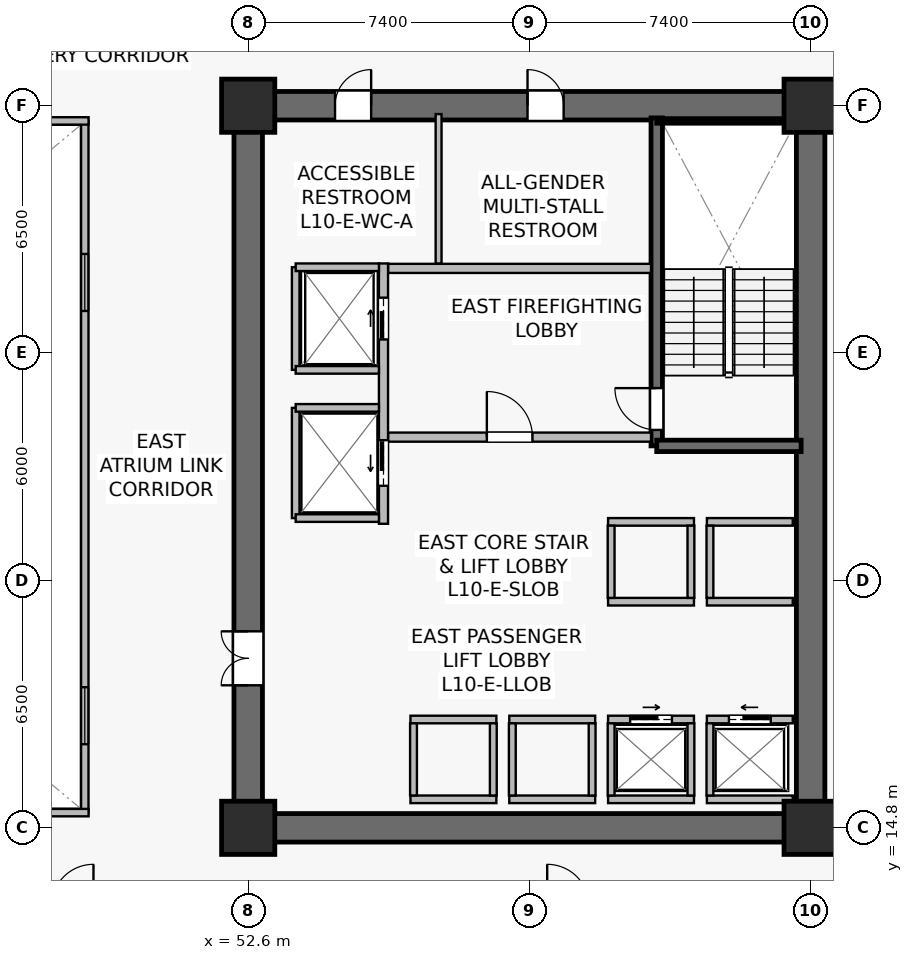
"""IFC4 building model, lengths in metres.
Left out: names, types, materials, properties, quantities, classifications, styles, units other than length and angle.
Written with IfcOpenShell. Run it as: python <this file> out.ifc"""

import sys

from ifc_helpers import new_model, si_unit, direction, frame, frame_2d, origin, origin_2d, place, context, subcontext, project, spatial, rectangle, extrude, source, transform, mapped, element, fill, save


model = new_model("IFC4")
c1 = context("Model", 3, precision=1e-05, world=origin(), true_north=direction((0.0, 1.0)))
c2 = subcontext(c1, "Body", "Model", "MODEL_VIEW")
j1 = project(units=[si_unit("LENGTHUNIT", "METRE"), si_unit("PLANEANGLEUNIT", "RADIAN")], contexts=[c1])
p1 = place(None, origin())
s1 = spatial("IfcSite", under=j1, at=p1, CompositionType="ELEMENT")
p2 = place(p1, origin())
s2 = spatial("IfcBuilding", under=s1, at=p2, CompositionType="ELEMENT")
p3 = place(p2, frame((0.0, 0.0, 41.6)))
s3 = spatial("IfcBuildingStorey", under=s2, at=p3, CompositionType="ELEMENT", Elevation=41.6)
p4 = place(p3, frame((52.225, 14.8, 0.0), z_axis=(0.0, 0.0, 1.0), x_axis=(1.0, 0.0, 0.0)))
e1 = element("IfcWall", 1, at=p4, inside=s3, PredefinedType="SHEAR", context=c2, shape_type="SweptSolid", body=[
    extrude(rectangle(XDim=15.55, YDim=0.75, at=frame_2d((7.775, 0.0))), origin(), (0.0, 0.0, 1.0), 3.78),
])
p5 = place(p3, frame((52.225, 33.8, 0.0), z_axis=(0.0, 0.0, 1.0), x_axis=(1.0, 0.0, 0.0)))
e2 = element("IfcWall", 2, at=p5, inside=s3, PredefinedType="SHEAR", context=c2, shape_type="SweptSolid", body=[
    extrude(rectangle(XDim=15.55, YDim=0.75, at=frame_2d((7.775, 0.0))), origin(), (0.0, 0.0, 1.0), 3.78),
])
p6 = place(p5, frame((7.725, 0.0, 0.0)))
e3 = element("IfcOpeningElement", 3, at=p6, cuts=e2, PredefinedType="OPENING", context=c2, shape_type="SweptSolid", body=[
    extrude(rectangle(XDim=0.95, YDim=2.15, at=frame_2d((0.475, 1.075))), frame((0.0, 0.385, 0.0), z_axis=(0.0, -1.0, 0.0), x_axis=(1.0, 0.0, 0.0)), (0.0, 0.0, 1.0), 0.77),
])
p7 = place(p5, frame((2.66, 0.0, 0.0)))
e4 = element("IfcOpeningElement", 4, at=p7, cuts=e2, PredefinedType="OPENING", context=c2, shape_type="SweptSolid", body=[
    extrude(rectangle(XDim=0.95, YDim=2.15, at=frame_2d((0.475, 1.075))), frame((0.0, 0.385, 0.0), z_axis=(0.0, -1.0, 0.0), x_axis=(1.0, 0.0, 0.0)), (0.0, 0.0, 1.0), 0.77),
])
p8 = place(p3, frame((52.6, 15.175, 0.0), z_axis=(0.0, 0.0, 1.0), x_axis=(0.0, 1.0, 0.0)))
e5 = element("IfcWall", 5, at=p8, inside=s3, PredefinedType="SHEAR", context=c2, shape_type="SweptSolid", body=[
    extrude(rectangle(XDim=18.25, YDim=0.75, at=frame_2d((9.125, 0.0))), origin(), (0.0, 0.0, 1.0), 3.78),
])
p9 = place(p8, frame((3.375, 0.0, 0.0)))
e6 = element("IfcOpeningElement", 6, at=p9, cuts=e5, PredefinedType="OPENING", context=c2, shape_type="SweptSolid", body=[
    extrude(rectangle(XDim=1.42, YDim=2.2, at=frame_2d((0.71, 1.1))), frame((0.0, 0.385, 0.0), z_axis=(0.0, -1.0, 0.0), x_axis=(1.0, 0.0, 0.0)), (0.0, 0.0, 1.0), 0.77),
])
p10 = place(p3, frame((67.4, 15.175, 0.0), z_axis=(0.0, 0.0, 1.0), x_axis=(0.0, 1.0, 0.0)))
e7 = element("IfcWall", 7, at=p10, inside=s3, PredefinedType="SHEAR", context=c2, shape_type="SweptSolid", body=[
    extrude(rectangle(XDim=18.25, YDim=0.75, at=frame_2d((9.125, 0.0))), origin(), (0.0, 0.0, 1.0), 3.78),
])
p11 = place(p3, frame((63.35, 24.85, 0.0), z_axis=(0.0, 0.0, 1.0), x_axis=(0.0, 1.0, 0.0)))
e8 = element("IfcWall", 8, at=p11, inside=s3, PredefinedType="SHEAR", context=c2, shape_type="SweptSolid", body=[
    extrude(rectangle(XDim=8.63, YDim=0.3, at=frame_2d((4.315, 0.0))), origin(), (0.0, 0.0, 1.0), 3.78),
])
p12 = place(p11, frame((0.42, 0.0, 0.0)))
e9 = element("IfcOpeningElement", 9, at=p12, cuts=e8, PredefinedType="OPENING", context=c2, shape_type="SweptSolid", body=[
    extrude(rectangle(XDim=1.1, YDim=2.15, at=frame_2d((0.55, 1.075))), frame((0.0, 0.16, 0.0), z_axis=(0.0, -1.0, 0.0), x_axis=(1.0, 0.0, 0.0)), (0.0, 0.0, 1.0), 0.32),
])
p13 = place(p3, frame((63.35, 24.85, 0.0), z_axis=(0.0, 0.0, 1.0), x_axis=(1.0, 0.0, 0.0)))
e10 = element("IfcWall", 10, at=p13, inside=s3, PredefinedType="SHEAR", context=c2, shape_type="SweptSolid", body=[
    extrude(rectangle(XDim=3.8, YDim=0.3, at=frame_2d((1.9, 0.0))), origin(), (0.0, 0.0, 1.0), 3.78),
])
p14 = place(p3, frame((63.35, 33.4, 0.0), z_axis=(0.0, 0.0, 1.0), x_axis=(1.0, 0.0, 0.0)))
e11 = element("IfcWall", 11, at=p14, inside=s3, PredefinedType="SOLIDWALL", context=c2, shape_type="SweptSolid", body=[
    extrude(rectangle(XDim=3.72, YDim=0.12, at=frame_2d((1.86, 0.0))), origin(), (0.0, 0.0, 1.0), 3.78),
])
m1 = source(origin(), c2, "Body", "SweptSolid", [
    extrude(rectangle(XDim=1.4, YDim=1.4, at=origin_2d()), origin(), (0.0, 0.0, 1.0), 4.1),
])
for number, where, z_axis, x_axis in (
    (12, (52.6, 14.8, 0.0), (0.0, 0.0, 1.0), (1.0, 0.0, 0.0)),
    (13, (67.4, 14.8, 0.0), (0.0, 0.0, 1.0), (1.0, 0.0, 0.0)),
    (14, (52.6, 33.8, 0.0), (0.0, 0.0, 1.0), (1.0, 0.0, 0.0)),
    (15, (67.4, 33.8, 0.0), (0.0, 0.0, 1.0), (1.0, 0.0, 0.0)),
):
    element("IfcColumn", number, at=place(p3, frame(where, z_axis=z_axis, x_axis=x_axis)), inside=s3, PredefinedType="COLUMN", context=c2, shape_type="MappedRepresentation", body=[
        mapped(m1, transform((0.0, 0.0, 0.0), scale=1.0)),
    ])
p15 = place(p3, frame((56.28, 25.08, 0.0), z_axis=(0.0, 0.0, 1.0), x_axis=(1.0, 0.0, 0.0)))
e16 = element("IfcWall", 16, at=p15, inside=s3, PredefinedType="SOLIDWALL", context=c2, shape_type="SweptSolid", body=[
    extrude(rectangle(XDim=6.92, YDim=0.24, at=frame_2d((3.46, 0.0))), origin(), (0.0, 0.0, 1.0), 3.065),
])
p16 = place(p15, frame((2.6, 0.0, 0.0)))
e17 = element("IfcOpeningElement", 17, at=p16, cuts=e16, PredefinedType="OPENING", context=c2, shape_type="SweptSolid", body=[
    extrude(rectangle(XDim=1.2, YDim=2.16, at=frame_2d((0.6, 1.08))), frame((0.0, 0.13, 0.0), z_axis=(0.0, -1.0, 0.0), x_axis=(1.0, 0.0, 0.0)), (0.0, 0.0, 1.0), 0.26),
])
p17 = place(p3, frame((56.28, 29.52, 0.0), z_axis=(0.0, 0.0, 1.0), x_axis=(1.0, 0.0, 0.0)))
e18 = element("IfcWall", 18, at=p17, inside=s3, PredefinedType="SOLIDWALL", context=c2, shape_type="SweptSolid", body=[
    extrude(rectangle(XDim=6.92, YDim=0.24, at=frame_2d((3.46, 0.0))), origin(), (0.0, 0.0, 1.0), 3.065),
])
p18 = place(p3, frame((56.16, 22.8, 0.0), z_axis=(0.0, 0.0, 1.0), x_axis=(0.0, 1.0, 0.0)))
e19 = element("IfcWall", 19, at=p18, inside=s3, PredefinedType="SOLIDWALL", context=c2, shape_type="SweptSolid", body=[
    extrude(rectangle(XDim=6.85, YDim=0.24, at=frame_2d((3.425, 0.0))), origin(), (0.0, 0.0, 1.0), 2.865),
])
p19 = place(p18, frame((4.85, 0.0, 0.0)))
e20 = element("IfcOpeningElement", 20, at=p19, cuts=e19, PredefinedType="OPENING", context=c2, shape_type="SweptSolid", body=[
    extrude(rectangle(XDim=1.1, YDim=2.22, at=frame_2d((0.55, 1.11))), frame((0.0, 0.13, 0.0), z_axis=(0.0, -1.0, 0.0), x_axis=(1.0, 0.0, 0.0)), (0.0, 0.0, 1.0), 0.26),
])
p20 = place(p18, frame((1.0, 0.0, 0.0)))
e21 = element("IfcOpeningElement", 21, at=p20, cuts=e19, PredefinedType="OPENING", context=c2, shape_type="SweptSolid", body=[
    extrude(rectangle(XDim=1.2, YDim=2.22, at=frame_2d((0.6, 1.11))), frame((0.0, 0.13, 0.0), z_axis=(0.0, -1.0, 0.0), x_axis=(1.0, 0.0, 0.0)), (0.0, 0.0, 1.0), 0.26),
])
p21 = place(p3, frame((64.67, 17.65, 0.0), z_axis=(0.0, 0.0, 1.0), x_axis=(1.0, 0.0, 0.0)))
e22 = element("IfcWall", 22, at=p21, inside=s3, PredefinedType="SOLIDWALL", context=c2, shape_type="SweptSolid", body=[
    extrude(rectangle(XDim=2.26, YDim=0.2, at=frame_2d((1.13, 0.0))), origin(), (0.0, 0.0, 1.0), 3.78),
])
p22 = place(p21, frame((0.58, 0.0, 0.0)))
e23 = element("IfcOpeningElement", 23, at=p22, cuts=e22, PredefinedType="OPENING", context=c2, shape_type="SweptSolid", body=[
    extrude(rectangle(XDim=1.1, YDim=2.22, at=frame_2d((0.55, 1.11))), frame((0.0, 0.11, 0.0), z_axis=(0.0, -1.0, 0.0), x_axis=(1.0, 0.0, 0.0)), (0.0, 0.0, 1.0), 0.22),
])
p23 = place(p3, frame((64.67, 15.55, 0.0), z_axis=(0.0, 0.0, 1.0), x_axis=(1.0, 0.0, 0.0)))
e24 = element("IfcWall", 24, at=p23, inside=s3, PredefinedType="SOLIDWALL", context=c2, shape_type="SweptSolid", body=[
    extrude(rectangle(XDim=2.26, YDim=0.2, at=frame_2d((1.13, 0.0))), origin(), (0.0, 0.0, 1.0), 3.78),
])
p24 = place(p3, frame((64.75, 15.65, 0.0), z_axis=(0.0, 0.0, 1.0), x_axis=(0.0, 1.0, 0.0)))
e25 = element("IfcWall", 25, at=p24, inside=s3, PredefinedType="SOLIDWALL", context=c2, shape_type="SweptSolid", body=[
    extrude(rectangle(XDim=1.9, YDim=0.18, at=frame_2d((0.95, 0.0))), origin(), (0.0, 0.0, 1.0), 3.78),
])
p25 = place(p3, frame((62.07, 17.65, 0.0), z_axis=(0.0, 0.0, 1.0), x_axis=(1.0, 0.0, 0.0)))
e26 = element("IfcWall", 26, at=p25, inside=s3, PredefinedType="SOLIDWALL", context=c2, shape_type="SweptSolid", body=[
    extrude(rectangle(XDim=2.26, YDim=0.2, at=frame_2d((1.13, 0.0))), origin(), (0.0, 0.0, 1.0), 3.78),
])
p26 = place(p25, frame((0.58, 0.0, 0.0)))
e27 = element("IfcOpeningElement", 27, at=p26, cuts=e26, PredefinedType="OPENING", context=c2, shape_type="SweptSolid", body=[
    extrude(rectangle(XDim=1.1, YDim=2.22, at=frame_2d((0.55, 1.11))), frame((0.0, 0.11, 0.0), z_axis=(0.0, -1.0, 0.0), x_axis=(1.0, 0.0, 0.0)), (0.0, 0.0, 1.0), 0.22),
])
p27 = place(p3, frame((62.07, 15.55, 0.0), z_axis=(0.0, 0.0, 1.0), x_axis=(1.0, 0.0, 0.0)))
e28 = element("IfcWall", 28, at=p27, inside=s3, PredefinedType="SOLIDWALL", context=c2, shape_type="SweptSolid", body=[
    extrude(rectangle(XDim=2.26, YDim=0.2, at=frame_2d((1.13, 0.0))), origin(), (0.0, 0.0, 1.0), 3.78),
])
for number, where, z_axis, x_axis in (
    (29, (62.15, 15.65, 0.0), (0.0, 0.0, 1.0), (0.0, 1.0, 0.0)),
    (30, (64.25, 15.65, 0.0), (0.0, 0.0, 1.0), (0.0, 1.0, 0.0)),
):
    element("IfcWall", number, at=place(p3, frame(where, z_axis=z_axis, x_axis=x_axis)), inside=s3, PredefinedType="SOLIDWALL", context=c2, shape_type="SweptSolid", body=[
        extrude(rectangle(XDim=1.9, YDim=0.18, at=frame_2d((0.95, 0.0))), origin(), (0.0, 0.0, 1.0), 3.78),
    ])
for number, where, z_axis, x_axis in (
    (31, (59.47, 17.65, 0.0), (0.0, 0.0, 1.0), (1.0, 0.0, 0.0)),
    (32, (59.47, 15.55, 0.0), (0.0, 0.0, 1.0), (1.0, 0.0, 0.0)),
):
    element("IfcWall", number, at=place(p3, frame(where, z_axis=z_axis, x_axis=x_axis)), inside=s3, PredefinedType="SOLIDWALL", context=c2, shape_type="SweptSolid", body=[
        extrude(rectangle(XDim=2.26, YDim=0.2, at=frame_2d((1.13, 0.0))), origin(), (0.0, 0.0, 1.0), 3.065),
    ])
for number, where, z_axis, x_axis in (
    (33, (59.55, 15.65, 0.0), (0.0, 0.0, 1.0), (0.0, 1.0, 0.0)),
    (34, (61.65, 15.65, 0.0), (0.0, 0.0, 1.0), (0.0, 1.0, 0.0)),
):
    element("IfcWall", number, at=place(p3, frame(where, z_axis=z_axis, x_axis=x_axis)), inside=s3, PredefinedType="SOLIDWALL", context=c2, shape_type="SweptSolid", body=[
        extrude(rectangle(XDim=1.9, YDim=0.18, at=frame_2d((0.95, 0.0))), origin(), (0.0, 0.0, 1.0), 3.78),
    ])
for number, where, z_axis, x_axis in (
    (35, (56.87, 17.65, 0.0), (0.0, 0.0, 1.0), (1.0, 0.0, 0.0)),
    (36, (56.87, 15.55, 0.0), (0.0, 0.0, 1.0), (1.0, 0.0, 0.0)),
):
    element("IfcWall", number, at=place(p3, frame(where, z_axis=z_axis, x_axis=x_axis)), inside=s3, PredefinedType="SOLIDWALL", context=c2, shape_type="SweptSolid", body=[
        extrude(rectangle(XDim=2.26, YDim=0.2, at=frame_2d((1.13, 0.0))), origin(), (0.0, 0.0, 1.0), 3.78),
    ])
for number, where, z_axis, x_axis in (
    (37, (56.95, 15.65, 0.0), (0.0, 0.0, 1.0), (0.0, 1.0, 0.0)),
    (38, (59.05, 15.65, 0.0), (0.0, 0.0, 1.0), (0.0, 1.0, 0.0)),
):
    element("IfcWall", number, at=place(p3, frame(where, z_axis=z_axis, x_axis=x_axis)), inside=s3, PredefinedType="SOLIDWALL", context=c2, shape_type="SweptSolid", body=[
        extrude(rectangle(XDim=1.9, YDim=0.18, at=frame_2d((0.95, 0.0))), origin(), (0.0, 0.0, 1.0), 3.78),
    ])
for number, where, z_axis, x_axis in (
    (39, (64.67, 20.75, 0.0), (0.0, 0.0, 1.0), (1.0, 0.0, 0.0)),
    (40, (64.67, 22.85, 0.0), (0.0, 0.0, 1.0), (1.0, 0.0, 0.0)),
):
    element("IfcWall", number, at=place(p3, frame(where, z_axis=z_axis, x_axis=x_axis)), inside=s3, PredefinedType="SOLIDWALL", context=c2, shape_type="SweptSolid", body=[
        extrude(rectangle(XDim=2.26, YDim=0.2, at=frame_2d((1.13, 0.0))), origin(), (0.0, 0.0, 1.0), 3.78),
    ])
p28 = place(p3, frame((64.75, 20.85, 0.0), z_axis=(0.0, 0.0, 1.0), x_axis=(0.0, 1.0, 0.0)))
e41 = element("IfcWall", 41, at=p28, inside=s3, PredefinedType="SOLIDWALL", context=c2, shape_type="SweptSolid", body=[
    extrude(rectangle(XDim=1.9, YDim=0.18, at=frame_2d((0.95, 0.0))), origin(), (0.0, 0.0, 1.0), 3.78),
])
for number, where, z_axis, x_axis in (
    (42, (62.07, 20.75, 0.0), (0.0, 0.0, 1.0), (1.0, 0.0, 0.0)),
    (43, (62.07, 22.85, 0.0), (0.0, 0.0, 1.0), (1.0, 0.0, 0.0)),
):
    element("IfcWall", number, at=place(p3, frame(where, z_axis=z_axis, x_axis=x_axis)), inside=s3, PredefinedType="SOLIDWALL", context=c2, shape_type="SweptSolid", body=[
        extrude(rectangle(XDim=2.26, YDim=0.2, at=frame_2d((1.13, 0.0))), origin(), (0.0, 0.0, 1.0), 3.78),
    ])
for number, where, z_axis, x_axis in (
    (44, (62.15, 20.85, 0.0), (0.0, 0.0, 1.0), (0.0, 1.0, 0.0)),
    (45, (64.25, 20.85, 0.0), (0.0, 0.0, 1.0), (0.0, 1.0, 0.0)),
):
    element("IfcWall", number, at=place(p3, frame(where, z_axis=z_axis, x_axis=x_axis)), inside=s3, PredefinedType="SOLIDWALL", context=c2, shape_type="SweptSolid", body=[
        extrude(rectangle(XDim=1.9, YDim=0.18, at=frame_2d((0.95, 0.0))), origin(), (0.0, 0.0, 1.0), 3.78),
    ])
p29 = place(p3, frame((53.85, 26.85, 0.0), z_axis=(0.0, 0.0, 1.0), x_axis=(0.0, 1.0, 0.0)))
e46 = element("IfcWall", 46, at=p29, inside=s3, PredefinedType="SOLIDWALL", context=c2, shape_type="SweptSolid", body=[
    extrude(rectangle(XDim=2.7, YDim=0.2, at=frame_2d((1.35, 0.0))), origin(), (0.0, 0.0, 1.0), 3.78),
])
p30 = place(p3, frame((53.85, 29.55, 0.0), z_axis=(0.0, 0.0, 1.0), x_axis=(1.0, 0.0, 0.0)))
e47 = element("IfcWall", 47, at=p30, inside=s3, PredefinedType="SOLIDWALL", context=c2, shape_type="SweptSolid", body=[
    extrude(rectangle(XDim=2.19, YDim=0.2, at=frame_2d((1.095, 0.0))), origin(), (0.0, 0.0, 1.0), 3.78),
])
p31 = place(p3, frame((53.85, 26.85, 0.0), z_axis=(0.0, 0.0, 1.0), x_axis=(1.0, 0.0, 0.0)))
e48 = element("IfcWall", 48, at=p31, inside=s3, PredefinedType="SOLIDWALL", context=c2, shape_type="SweptSolid", body=[
    extrude(rectangle(XDim=2.19, YDim=0.2, at=frame_2d((1.095, 0.0))), origin(), (0.0, 0.0, 1.0), 3.177),
])
p32 = place(p3, frame((53.85, 22.95, 0.0), z_axis=(0.0, 0.0, 1.0), x_axis=(0.0, 1.0, 0.0)))
e49 = element("IfcWall", 49, at=p32, inside=s3, PredefinedType="SOLIDWALL", context=c2, shape_type="SweptSolid", body=[
    extrude(rectangle(XDim=2.9, YDim=0.2, at=frame_2d((1.45, 0.0))), origin(), (0.0, 0.0, 1.0), 2.865),
])
for number, where, z_axis, x_axis in (
    (50, (53.85, 25.85, 0.0), (0.0, 0.0, 1.0), (1.0, 0.0, 0.0)),
    (51, (53.85, 22.95, 0.0), (0.0, 0.0, 1.0), (1.0, 0.0, 0.0)),
):
    element("IfcWall", number, at=place(p3, frame(where, z_axis=z_axis, x_axis=x_axis)), inside=s3, PredefinedType="SOLIDWALL", context=c2, shape_type="SweptSolid", body=[
        extrude(rectangle(XDim=2.19, YDim=0.2, at=frame_2d((1.095, 0.0))), origin(), (0.0, 0.0, 1.0), 3.78),
    ])
p33 = place(p3, frame((57.61, 29.65, 0.0), z_axis=(0.0, 0.0, 1.0), x_axis=(0.0, 1.0, 0.0)))
e52 = element("IfcWall", 52, at=p33, inside=s3, PredefinedType="PLUMBINGWALL", context=c2, shape_type="SweptSolid", body=[
    extrude(rectangle(XDim=3.93, YDim=0.155, at=frame_2d((1.965, 0.0))), origin(), (0.0, 0.0, 1.0), 3.78),
])
p34 = place(p3, frame((48.3, 15.2, 0.0), z_axis=(0.0, 0.0, 1.0), x_axis=(0.0, 1.0, 0.0)))
e53 = element("IfcWall", 53, at=p34, inside=s3, PredefinedType="SOLIDWALL", context=c2, shape_type="SweptSolid", body=[
    extrude(rectangle(XDim=18.2, YDim=0.195, at=frame_2d((9.1, 0.0))), origin(), (0.0, 0.0, 1.0), 3.78),
])
p35 = place(p34, frame((1.8, 0.0, 0.9)))
e54 = element("IfcOpeningElement", 54, at=p35, cuts=e53, PredefinedType="OPENING", context=c2, shape_type="SweptSolid", body=[
    extrude(rectangle(XDim=1.5, YDim=1.4, at=frame_2d((0.75, 0.7))), frame((0.0, 0.107, 0.0), z_axis=(0.0, -1.0, 0.0), x_axis=(1.0, 0.0, 0.0)), (0.0, 0.0, 1.0), 0.215),
])
p36 = place(p34, frame((13.2, 0.0, 0.9)))
e55 = element("IfcOpeningElement", 55, at=p36, cuts=e53, PredefinedType="OPENING", context=c2, shape_type="SweptSolid", body=[
    extrude(rectangle(XDim=1.5, YDim=1.4, at=frame_2d((0.75, 0.7))), frame((0.0, 0.107, 0.0), z_axis=(0.0, -1.0, 0.0), x_axis=(1.0, 0.0, 0.0)), (0.0, 0.0, 1.0), 0.215),
])
for number, where, z_axis, x_axis in (
    (56, (26.4, 15.2, 0.0), (0.0, 0.0, 1.0), (1.0, 0.0, 0.0)),
    (57, (26.4, 33.4, 0.0), (0.0, 0.0, 1.0), (1.0, 0.0, 0.0)),
):
    element("IfcWall", number, at=place(p3, frame(where, z_axis=z_axis, x_axis=x_axis)), inside=s3, PredefinedType="SOLIDWALL", context=c2, shape_type="SweptSolid", body=[
        extrude(rectangle(XDim=22.0, YDim=0.195, at=frame_2d((11.0, 0.0))), origin(), (0.0, 0.0, 1.0), 3.78),
    ])
m2 = source(origin(), c2, "Body", "SweptSolid", [
    extrude(rectangle(XDim=1.5, YDim=1.4, at=frame_2d((0.75, 0.7))), frame((0.0, 0.03, 0.0), z_axis=(0.0, -1.0, 0.0), x_axis=(1.0, 0.0, 0.0)), (0.0, 0.0, 1.0), 0.06),
])
p37 = place(p35, origin())
e58 = element("IfcWindow", 58, at=p37, inside=s3, PartitioningType="SINGLE_PANEL", PredefinedType="WINDOW", context=c2, shape_type="MappedRepresentation", body=[
    mapped(m2, transform((0.0, 0.0, 0.0), scale=1.0)),
])
fill(e54, e58)
p38 = place(p36, origin())
e59 = element("IfcWindow", 59, at=p38, inside=s3, PartitioningType="SINGLE_PANEL", PredefinedType="WINDOW", context=c2, shape_type="MappedRepresentation", body=[
    mapped(m2, transform((0.0, 0.0, 0.0), scale=1.0)),
])
fill(e55, e59)
m3 = source(origin(), c2, "Body", "SweptSolid", [
    extrude(rectangle(XDim=1.1, YDim=2.15, at=frame_2d((0.55, 1.075))), frame((0.0, 0.025, 0.0), z_axis=(0.0, -1.0, 0.0), x_axis=(1.0, 0.0, 0.0)), (0.0, 0.0, 1.0), 0.05),
])
p39 = place(p12, origin())
e60 = element("IfcDoor", 60, at=p39, inside=s3, OperationType="SINGLE_SWING_RIGHT", PredefinedType="DOOR", context=c2, shape_type="MappedRepresentation", body=[
    mapped(m3, transform((0.0, 0.0, 0.0), scale=1.0)),
])
fill(e9, e60)
m4 = source(origin(), c2, "Body", "SweptSolid", [
    extrude(rectangle(XDim=1.2, YDim=2.16, at=frame_2d((0.6, 1.08))), frame((0.0, 0.025, 0.0), z_axis=(0.0, -1.0, 0.0), x_axis=(1.0, 0.0, 0.0)), (0.0, 0.0, 1.0), 0.05),
])
p40 = place(p16, origin())
e61 = element("IfcDoor", 61, at=p40, inside=s3, OperationType="SINGLE_SWING_LEFT", PredefinedType="DOOR", context=c2, shape_type="MappedRepresentation", body=[
    mapped(m4, transform((0.0, 0.0, 0.0), scale=1.0)),
])
fill(e17, e61)
m5 = source(origin(), c2, "Body", "SweptSolid", [
    extrude(rectangle(XDim=1.1, YDim=2.22, at=frame_2d((0.55, 1.11))), frame((0.0, 0.025, 0.0), z_axis=(0.0, -1.0, 0.0), x_axis=(1.0, 0.0, 0.0)), (0.0, 0.0, 1.0), 0.05),
])
p41 = place(p22, origin())
e62 = element("IfcDoor", 62, at=p41, inside=s3, OperationType="SLIDING_TO_LEFT", PredefinedType="USERDEFINED", context=c2, shape_type="MappedRepresentation", body=[
    mapped(m5, transform((0.0, 0.0, 0.0), scale=1.0)),
])
fill(e23, e62)
p42 = place(p26, origin())
e63 = element("IfcDoor", 63, at=p42, inside=s3, OperationType="SLIDING_TO_RIGHT", PredefinedType="USERDEFINED", context=c2, shape_type="MappedRepresentation", body=[
    mapped(m5, transform((0.0, 0.0, 0.0), scale=1.0)),
])
fill(e27, e63)
p43 = place(p19, origin())
e64 = element("IfcDoor", 64, at=p43, inside=s3, OperationType="SLIDING_TO_RIGHT", PredefinedType="USERDEFINED", context=c2, shape_type="MappedRepresentation", body=[
    mapped(m5, transform((0.0, 0.0, 0.0), scale=1.0)),
])
fill(e20, e64)
m6 = source(origin(), c2, "Body", "SweptSolid", [
    extrude(rectangle(XDim=1.2, YDim=2.22, at=frame_2d((0.6, 1.11))), frame((0.0, 0.025, 0.0), z_axis=(0.0, -1.0, 0.0), x_axis=(1.0, 0.0, 0.0)), (0.0, 0.0, 1.0), 0.05),
])
p44 = place(p20, origin())
e65 = element("IfcDoor", 65, at=p44, inside=s3, OperationType="SLIDING_TO_LEFT", PredefinedType="USERDEFINED", context=c2, shape_type="MappedRepresentation", body=[
    mapped(m6, transform((0.0, 0.0, 0.0), scale=1.0)),
])
fill(e21, e65)
m7 = source(origin(), c2, "Body", "SweptSolid", [
    extrude(rectangle(XDim=1.42, YDim=2.2, at=frame_2d((0.71, 1.1))), frame((0.0, 0.025, 0.0), z_axis=(0.0, -1.0, 0.0), x_axis=(1.0, 0.0, 0.0)), (0.0, 0.0, 1.0), 0.05),
])
p45 = place(p9, origin())
e66 = element("IfcDoor", 66, at=p45, inside=s3, OperationType="DOUBLE_DOOR_SINGLE_SWING", PredefinedType="DOOR", context=c2, shape_type="MappedRepresentation", body=[
    mapped(m7, transform((0.0, 0.0, 0.0), scale=1.0)),
])
fill(e6, e66)
m8 = source(origin(), c2, "Body", "SweptSolid", [
    extrude(rectangle(XDim=0.95, YDim=2.15, at=frame_2d((0.475, 1.075))), frame((0.0, 0.025, 0.0), z_axis=(0.0, -1.0, 0.0), x_axis=(1.0, 0.0, 0.0)), (0.0, 0.0, 1.0), 0.05),
])
p46 = place(p6, origin())
e67 = element("IfcDoor", 67, at=p46, inside=s3, OperationType="SINGLE_SWING_LEFT", PredefinedType="DOOR", context=c2, shape_type="MappedRepresentation", body=[
    mapped(m8, transform((0.0, 0.0, 0.0), scale=1.0)),
])
fill(e3, e67)
p47 = place(p7, origin())
e68 = element("IfcDoor", 68, at=p47, inside=s3, OperationType="SINGLE_SWING_RIGHT", PredefinedType="DOOR", context=c2, shape_type="MappedRepresentation", body=[
    mapped(m8, transform((0.0, 0.0, 0.0), scale=1.0)),
])
fill(e4, e68)
save(model, sys.argv[1])
